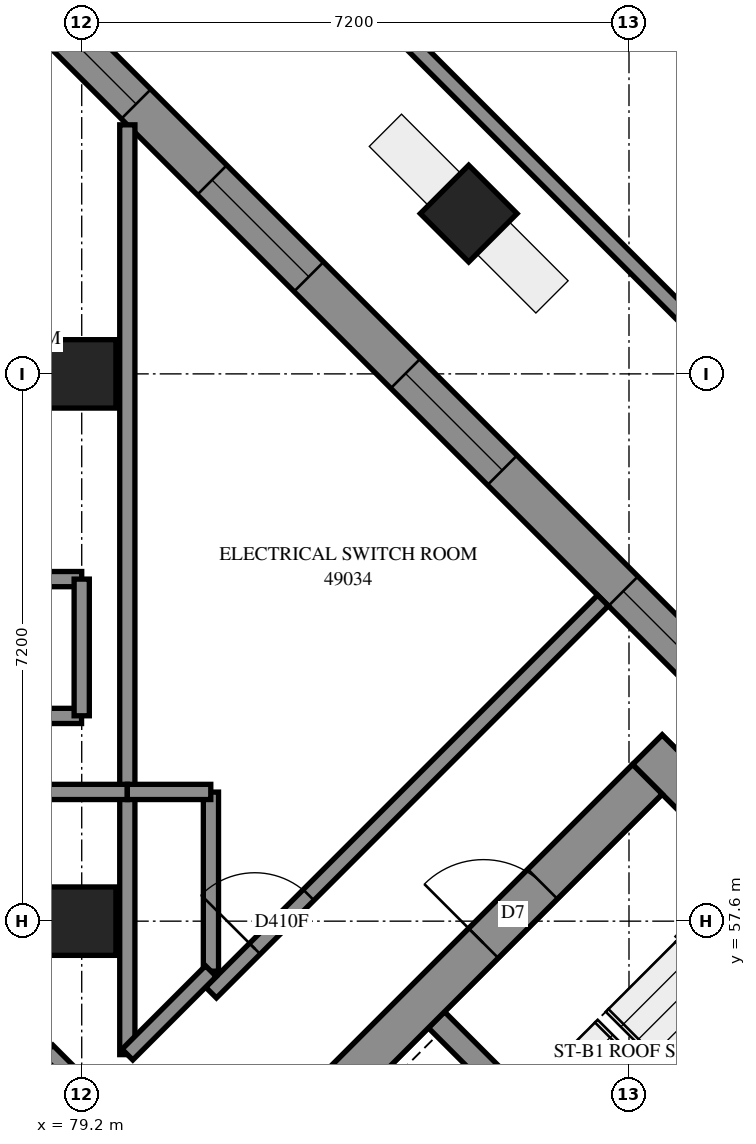
"""IFC4 building model, lengths in metres.
Left out: names, types, materials, properties, quantities, classifications, styles, units other than length and angle.
Written with IfcOpenShell. Run it as: python <this file> out.ifc"""

import sys

from ifc_helpers import new_model, si_unit, direction, frame, frame_2d, origin, origin_2d, place, context, subcontext, project, spatial, polyline, rectangle, outline, extrude, element, fill, save


model = new_model("IFC4")
c1 = context("Model", 3, precision=1e-05, world=origin(), true_north=direction((0.0, 1.0)))
c2 = subcontext(c1, "Body", "Model", "MODEL_VIEW")
j1 = project(units=[si_unit("LENGTHUNIT", "METRE"), si_unit("PLANEANGLEUNIT", "RADIAN")], contexts=[c1])
p1 = place(None, origin())
s1 = spatial("IfcSite", under=j1, at=p1, CompositionType="ELEMENT")
p2 = place(p1, origin())
s2 = spatial("IfcBuilding", under=s1, at=p2, CompositionType="ELEMENT")
p3 = place(p2, frame((0.0, 0.0, 180.4)))
s3 = spatial("IfcBuildingStorey", under=s2, at=p3, CompositionType="ELEMENT", Elevation=180.4)
for number, where, z_axis, x_axis in (
    (1, (79.2, 57.6, 0.0), (0.0, 0.0, 1.0), (1.0, 0.0, 0.0)),
    (2, (79.2, 64.8, 0.0), (0.0, 0.0, 1.0), (1.0, 0.0, 0.0)),
):
    element("IfcColumn", number, at=place(p3, frame(where, z_axis=z_axis, x_axis=x_axis)), inside=s3, PredefinedType="COLUMN", context=c2, shape_type="SweptSolid", body=[
        extrude(rectangle(XDim=0.9, YDim=0.9, at=origin_2d()), origin(), (0.0, 0.0, 1.0), 4.7),
    ])
p4 = place(p3, frame((84.291, 66.909, -0.3), z_axis=(0.0, 0.0, 1.0), x_axis=(0.7071067812, -0.7071067812, 0.0)))
e3 = element("IfcColumn", 3, at=p4, inside=s3, PredefinedType="COLUMN", context=c2, shape_type="SweptSolid", body=[
    extrude(rectangle(XDim=0.9, YDim=0.9, at=origin_2d()), origin(), (0.0, 0.0, 1.0), 5.0),
])
p5 = place(p3, frame((86.642, 59.855, -0.3), z_axis=(0.0, 0.0, 1.0), x_axis=(0.707110007, -0.7071035554, 0.0)))
e4 = element("IfcWall", 4, at=p5, inside=s3, PredefinedType="SHEAR", context=c2, shape_type="SweptSolid", body=[
    extrude(rectangle(XDim=15.5, YDim=0.55, at=frame_2d((7.75, 0.0))), origin(), (0.0, 0.0, 1.0), 4.3),
])
p6 = place(p5, frame((10.55, 0.0, 0.3)))
e5 = element("IfcOpeningElement", 5, at=p6, cuts=e4, PredefinedType="OPENING", context=c2, shape_type="SweptSolid", body=[
    extrude(rectangle(XDim=0.8, YDim=2.1, at=frame_2d((0.4, 1.05))), frame((0.0, 0.285, 0.0), z_axis=(0.0, -1.0, 0.0), x_axis=(1.0, 0.0, 0.0)), (0.0, 0.0, 1.0), 0.57),
])
p7 = place(p3, frame((76.46, 49.284, -0.3), z_axis=(0.0, 0.0, 1.0), x_axis=(0.7071067812, 0.7071067812, 0.0)))
e6 = element("IfcWall", 6, at=p7, inside=s3, PredefinedType="SHEAR", context=c2, shape_type="SweptSolid", body=[
    extrude(rectangle(XDim=14.4, YDim=0.55, at=frame_2d((7.2, 0.0))), origin(), (0.0, 0.0, 1.0), 4.3),
])
p8 = place(p7, frame((4.55, 0.0, 0.3)))
e7 = element("IfcOpeningElement", 7, at=p8, cuts=e6, PredefinedType="OPENING", context=c2, shape_type="SweptSolid", body=[
    extrude(rectangle(XDim=1.1, YDim=2.1, at=frame_2d((0.55, 1.05))), frame((0.0, 0.285, 0.0), z_axis=(0.0, -1.0, 0.0), x_axis=(1.0, 0.0, 0.0)), (0.0, 0.0, 1.0), 0.57),
])
p9 = place(p7, frame((11.35, 0.0, 0.3)))
e8 = element("IfcOpeningElement", 8, at=p9, cuts=e6, PredefinedType="OPENING", context=c2, shape_type="SweptSolid", body=[
    extrude(rectangle(XDim=1.1, YDim=2.1, at=frame_2d((0.55, 1.05))), frame((0.0, 0.285, 0.0), z_axis=(0.0, -1.0, 0.0), x_axis=(1.0, 0.0, 0.0)), (0.0, 0.0, 1.0), 0.57),
])
p10 = place(p3, frame((83.867, 56.302, 0.0), z_axis=(0.0, 0.0, 1.0), x_axis=(0.7071137256, -0.7070998367, 0.0)))
e9 = element("IfcWall", 9, at=p10, inside=s3, PredefinedType="SOLIDWALL", context=c2, shape_type="SweptSolid", body=[
    extrude(rectangle(XDim=7.2, YDim=0.3, at=frame_2d((3.6, 0.0))), origin(), (0.0, 0.0, 1.0), 4.7),
])
p11 = place(p3, frame((100.024, 48.241, 0.0), z_axis=(0.0, 0.0, 1.0), x_axis=(-0.7071067812, 0.7071067812, 0.0)))
e10 = element("IfcWall", 10, at=p11, inside=s3, PredefinedType="SOLIDWALL", context=c2, shape_type="SweptSolid", body=[
    extrude(outline(polyline([(-0.275, -0.275), (30.779, -0.275), (30.552, 0.275), (0.275, 0.275), (-0.275, -0.275)])), origin(), (0.0, 0.0, 1.0), 4.7),
])
p12 = place(p11, frame((3.625, 0.0, 0.9)))
e11 = element("IfcOpeningElement", 11, at=p12, cuts=e10, PredefinedType="OPENING", context=c2, shape_type="SweptSolid", body=[
    extrude(rectangle(XDim=1.8, YDim=3.6, at=frame_2d((0.9, 1.8))), frame((0.0, 0.285, 0.0), z_axis=(0.0, -1.0, 0.0), x_axis=(1.0, 0.0, 0.0)), (0.0, 0.0, 1.0), 0.57),
])
p13 = place(p11, frame((7.225, 0.0, 0.9)))
e12 = element("IfcOpeningElement", 12, at=p13, cuts=e10, PredefinedType="OPENING", context=c2, shape_type="SweptSolid", body=[
    extrude(rectangle(XDim=1.8, YDim=3.6, at=frame_2d((0.9, 1.8))), frame((0.0, 0.285, 0.0), z_axis=(0.0, -1.0, 0.0), x_axis=(1.0, 0.0, 0.0)), (0.0, 0.0, 1.0), 0.57),
])
p14 = place(p11, frame((10.825, 0.0, 0.9)))
e13 = element("IfcOpeningElement", 13, at=p14, cuts=e10, PredefinedType="OPENING", context=c2, shape_type="SweptSolid", body=[
    extrude(rectangle(XDim=1.8, YDim=3.6, at=frame_2d((0.9, 1.8))), frame((0.0, 0.285, 0.0), z_axis=(0.0, -1.0, 0.0), x_axis=(1.0, 0.0, 0.0)), (0.0, 0.0, 1.0), 0.57),
])
p15 = place(p11, frame((14.425, 0.0, 0.9)))
e14 = element("IfcOpeningElement", 14, at=p15, cuts=e10, PredefinedType="OPENING", context=c2, shape_type="SweptSolid", body=[
    extrude(rectangle(XDim=1.8, YDim=3.6, at=frame_2d((0.9, 1.8))), frame((0.0, 0.285, 0.0), z_axis=(0.0, -1.0, 0.0), x_axis=(1.0, 0.0, 0.0)), (0.0, 0.0, 1.0), 0.57),
])
p16 = place(p11, frame((17.575, 0.0, 0.9)))
e15 = element("IfcOpeningElement", 15, at=p16, cuts=e10, PredefinedType="OPENING", context=c2, shape_type="SweptSolid", body=[
    extrude(rectangle(XDim=1.8, YDim=3.6, at=frame_2d((0.9, 1.8))), frame((0.0, 0.285, 0.0), z_axis=(0.0, -1.0, 0.0), x_axis=(1.0, 0.0, 0.0)), (0.0, 0.0, 1.0), 0.57),
])
p17 = place(p11, frame((21.625, 0.0, 0.9)))
e16 = element("IfcOpeningElement", 16, at=p17, cuts=e10, PredefinedType="OPENING", context=c2, shape_type="SweptSolid", body=[
    extrude(rectangle(XDim=1.8, YDim=3.6, at=frame_2d((0.9, 1.8))), frame((0.0, 0.285, 0.0), z_axis=(0.0, -1.0, 0.0), x_axis=(1.0, 0.0, 0.0)), (0.0, 0.0, 1.0), 0.57),
])
p18 = place(p11, frame((25.225, 0.0, 0.9)))
e17 = element("IfcOpeningElement", 17, at=p18, cuts=e10, PredefinedType="OPENING", context=c2, shape_type="SweptSolid", body=[
    extrude(rectangle(XDim=1.8, YDim=3.6, at=frame_2d((0.9, 1.8))), frame((0.0, 0.285, 0.0), z_axis=(0.0, -1.0, 0.0), x_axis=(1.0, 0.0, 0.0)), (0.0, 0.0, 1.0), 0.57),
])
p19 = place(p11, frame((28.438, 0.0, 0.9)))
e18 = element("IfcOpeningElement", 18, at=p19, cuts=e10, PredefinedType="OPENING", context=c2, shape_type="SweptSolid", body=[
    extrude(rectangle(XDim=1.8, YDim=3.6, at=frame_2d((0.9, 1.8))), frame((0.0, 0.285, 0.0), z_axis=(0.0, -1.0, 0.0), x_axis=(1.0, 0.0, 0.0)), (0.0, 0.0, 1.0), 0.57),
])
p20 = place(p3, frame((102.747, 49.938, 0.0), z_axis=(0.0, 0.0, 1.0), x_axis=(-0.7071083109, 0.7071052514, 0.0)))
e19 = element("IfcWall", 19, at=p20, inside=s3, PredefinedType="SOLIDWALL", context=c2, shape_type="SweptSolid", body=[
    extrude(outline(polyline([(-0.1, -0.1), (32.726, -0.1), (32.644, 0.1), (0.1, 0.1), (-0.1, -0.1)])), origin(), (0.0, 0.0, 1.0), 4.7),
])
p21 = place(p3, frame((79.8, 59.3, 0.0), z_axis=(0.0, 0.0, 1.0), x_axis=(0.0, 1.0, 0.0)))
e20 = element("IfcWall", 20, at=p21, inside=s3, PredefinedType="PARTITIONING", context=c2, shape_type="SweptSolid", body=[
    extrude(rectangle(XDim=8.777, YDim=0.2, at=frame_2d((4.388, 0.0))), origin(), (0.0, 0.0, 1.0), 4.7),
])
p22 = place(p3, frame((80.901, 56.66, 0.0), z_axis=(0.0, 0.0, 1.0), x_axis=(0.7069628018, 0.7072507313, 0.0)))
e21 = element("IfcWall", 21, at=p22, inside=s3, PredefinedType="PARTITIONING", context=c2, shape_type="SweptSolid", body=[
    extrude(rectangle(XDim=7.293, YDim=0.2, at=frame_2d((3.647, 0.0))), origin(), (0.0, 0.0, 1.0), 4.7),
])
p23 = place(p22, frame((0.815, 0.0, 0.0)))
e22 = element("IfcOpeningElement", 22, at=p23, cuts=e21, PredefinedType="OPENING", context=c2, shape_type="SweptSolid", body=[
    extrude(rectangle(XDim=1.0, YDim=2.1, at=frame_2d((0.5, 1.05))), frame((0.0, 0.11, 0.0), z_axis=(0.0, -1.0, 0.0), x_axis=(1.0, 0.0, 0.0)), (0.0, 0.0, 1.0), 0.22),
])
p24 = place(p3, frame((75.1, 62.1, 0.0), z_axis=(0.0, 0.0, 1.0), x_axis=(1.0, 0.0, 0.0)))
e23 = element("IfcWall", 23, at=p24, inside=s3, PredefinedType="PARTITIONING", context=c2, shape_type="SweptSolid", body=[
    extrude(rectangle(XDim=4.1, YDim=0.2, at=frame_2d((2.05, 0.0))), origin(), (0.0, 0.0, 1.0), 4.7),
])
p25 = place(p3, frame((79.8, 55.844, 0.0), z_axis=(0.0, 0.0, 1.0), x_axis=(0.0, 1.0, 0.0)))
e24 = element("IfcWall", 24, at=p25, inside=s3, PredefinedType="PARTITIONING", context=c2, shape_type="SweptSolid", body=[
    extrude(rectangle(XDim=3.456, YDim=0.2, at=frame_2d((1.728, 0.0))), origin(), (0.0, 0.0, 1.0), 4.7),
])
p26 = place(p3, frame((80.9, 56.942, 0.0), z_axis=(0.0, 0.0, 1.0), x_axis=(0.0, 1.0, 0.0)))
e25 = element("IfcWall", 25, at=p26, inside=s3, PredefinedType="PARTITIONING", context=c2, shape_type="SweptSolid", body=[
    extrude(rectangle(XDim=2.356, YDim=0.2, at=frame_2d((1.178, 0.0))), origin(), (0.0, 0.0, 1.0), 4.7),
])
p27 = place(p3, frame((76.902, 60.3, 0.0), z_axis=(0.0, 0.0, 1.0), x_axis=(1.0, 0.0, 0.0)))
e26 = element("IfcWall", 26, at=p27, inside=s3, PredefinedType="PARTITIONING", context=c2, shape_type="SweptSolid", body=[
    extrude(rectangle(XDim=2.296, YDim=0.2, at=frame_2d((1.148, 0.0))), origin(), (0.0, 0.0, 1.0), 4.7),
])
p28 = place(p27, frame((0.825, 0.0, 0.0)))
e27 = element("IfcOpeningElement", 27, at=p28, cuts=e26, PredefinedType="OPENING", context=c2, shape_type="SweptSolid", body=[
    extrude(rectangle(XDim=1.0, YDim=2.1, at=frame_2d((0.5, 1.05))), frame((0.0, 0.11, 0.0), z_axis=(0.0, -1.0, 0.0), x_axis=(1.0, 0.0, 0.0)), (0.0, 0.0, 1.0), 0.22),
])
p29 = place(p3, frame((77.9, 59.3, 0.0), z_axis=(0.0, 0.0, 1.0), x_axis=(1.0, 0.0, 0.0)))
e28 = element("IfcWall", 28, at=p29, inside=s3, PredefinedType="PARTITIONING", context=c2, shape_type="SweptSolid", body=[
    extrude(rectangle(XDim=1.9, YDim=0.2, at=frame_2d((0.95, 0.0))), origin(), (0.0, 0.0, 1.0), 4.7),
])
p30 = place(p3, frame((79.2, 60.302, 0.0), z_axis=(0.0, 0.0, 1.0), x_axis=(0.0, 1.0, 0.0)))
e29 = element("IfcWall", 29, at=p30, inside=s3, PredefinedType="PARTITIONING", context=c2, shape_type="SweptSolid", body=[
    extrude(rectangle(XDim=1.798, YDim=0.2, at=frame_2d((0.899, 0.0))), origin(), (0.0, 0.0, 1.0), 4.7),
])
p31 = place(p3, frame((79.801, 55.845, 0.0), z_axis=(0.0, 0.0, 1.0), x_axis=(0.7071067812, 0.7071067812, 0.0)))
e30 = element("IfcWall", 30, at=p31, inside=s3, PredefinedType="PARTITIONING", context=c2, shape_type="SweptSolid", body=[
    extrude(rectangle(XDim=1.553, YDim=0.2, at=frame_2d((0.776, 0.0))), origin(), (0.0, 0.0, 1.0), 4.7),
])
p32 = place(p3, frame((79.8, 59.3, 0.0), z_axis=(0.0, 0.0, 1.0), x_axis=(1.0, 0.0, 0.0)))
e31 = element("IfcWall", 31, at=p32, inside=s3, PredefinedType="PARTITIONING", context=c2, shape_type="SweptSolid", body=[
    extrude(rectangle(XDim=1.098, YDim=0.2, at=frame_2d((0.549, 0.0))), origin(), (0.0, 0.0, 1.0), 4.7),
])
p33 = place(p3, frame((78.751, 55.897, 0.0), z_axis=(0.0, 0.0, 1.0), x_axis=(0.7071067812, -0.7071067812, 0.0)))
e32 = element("IfcWall", 32, at=p33, inside=s3, PredefinedType="PARTITIONING", context=c2, shape_type="SweptSolid", body=[
    extrude(rectangle(XDim=0.781, YDim=0.2, at=frame_2d((0.39, 0.0))), origin(), (0.0, 0.0, 1.0), 4.7),
])
p34 = place(p16, origin())
e33 = element("IfcWindow", 33, at=p34, inside=s3, PartitioningType="SINGLE_PANEL", PredefinedType="WINDOW", context=c2, shape_type="SweptSolid", body=[
    extrude(rectangle(XDim=1.8, YDim=3.6, at=frame_2d((0.9, 1.8))), frame((0.0, 0.155, 0.0), z_axis=(0.0, -1.0, 0.0), x_axis=(1.0, 0.0, 0.0)), (0.0, 0.0, 1.0), 0.06),
])
fill(e15, e33)
p35 = place(p17, origin())
e34 = element("IfcWindow", 34, at=p35, inside=s3, PartitioningType="SINGLE_PANEL", PredefinedType="WINDOW", context=c2, shape_type="SweptSolid", body=[
    extrude(rectangle(XDim=1.8, YDim=3.6, at=frame_2d((0.9, 1.8))), frame((0.0, 0.155, 0.0), z_axis=(0.0, -1.0, 0.0), x_axis=(1.0, 0.0, 0.0)), (0.0, 0.0, 1.0), 0.06),
])
fill(e16, e34)
p36 = place(p18, origin())
e35 = element("IfcWindow", 35, at=p36, inside=s3, PartitioningType="SINGLE_PANEL", PredefinedType="WINDOW", context=c2, shape_type="SweptSolid", body=[
    extrude(rectangle(XDim=1.8, YDim=3.6, at=frame_2d((0.9, 1.8))), frame((0.0, 0.155, 0.0), z_axis=(0.0, -1.0, 0.0), x_axis=(1.0, 0.0, 0.0)), (0.0, 0.0, 1.0), 0.06),
])
fill(e17, e35)
p37 = place(p19, origin())
e36 = element("IfcWindow", 36, at=p37, inside=s3, PartitioningType="SINGLE_PANEL", PredefinedType="WINDOW", context=c2, shape_type="SweptSolid", body=[
    extrude(rectangle(XDim=1.8, YDim=3.6, at=frame_2d((0.9, 1.8))), frame((0.0, 0.155, 0.0), z_axis=(0.0, -1.0, 0.0), x_axis=(1.0, 0.0, 0.0)), (0.0, 0.0, 1.0), 0.06),
])
fill(e18, e36)
p38 = place(p9, origin())
e37 = element("IfcDoor", 37, at=p38, inside=s3, OperationType="SINGLE_SWING_LEFT", PredefinedType="DOOR", context=c2, shape_type="SweptSolid", body=[
    extrude(rectangle(XDim=1.1, YDim=2.1, at=frame_2d((0.55, 1.05))), frame((0.0, 0.025, 0.0), z_axis=(0.0, -1.0, 0.0), x_axis=(1.0, 0.0, 0.0)), (0.0, 0.0, 1.0), 0.05),
])
fill(e8, e37)
p39 = place(p23, origin())
e38 = element("IfcDoor", 38, at=p39, inside=s3, OperationType="SINGLE_SWING_RIGHT", PredefinedType="DOOR", context=c2, shape_type="SweptSolid", body=[
    extrude(rectangle(XDim=1.0, YDim=2.1, at=frame_2d((0.5, 1.05))), frame((0.0, 0.025, 0.0), z_axis=(0.0, -1.0, 0.0), x_axis=(1.0, 0.0, 0.0)), (0.0, 0.0, 1.0), 0.05),
])
fill(e22, e38)
save(model, sys.argv[1])
